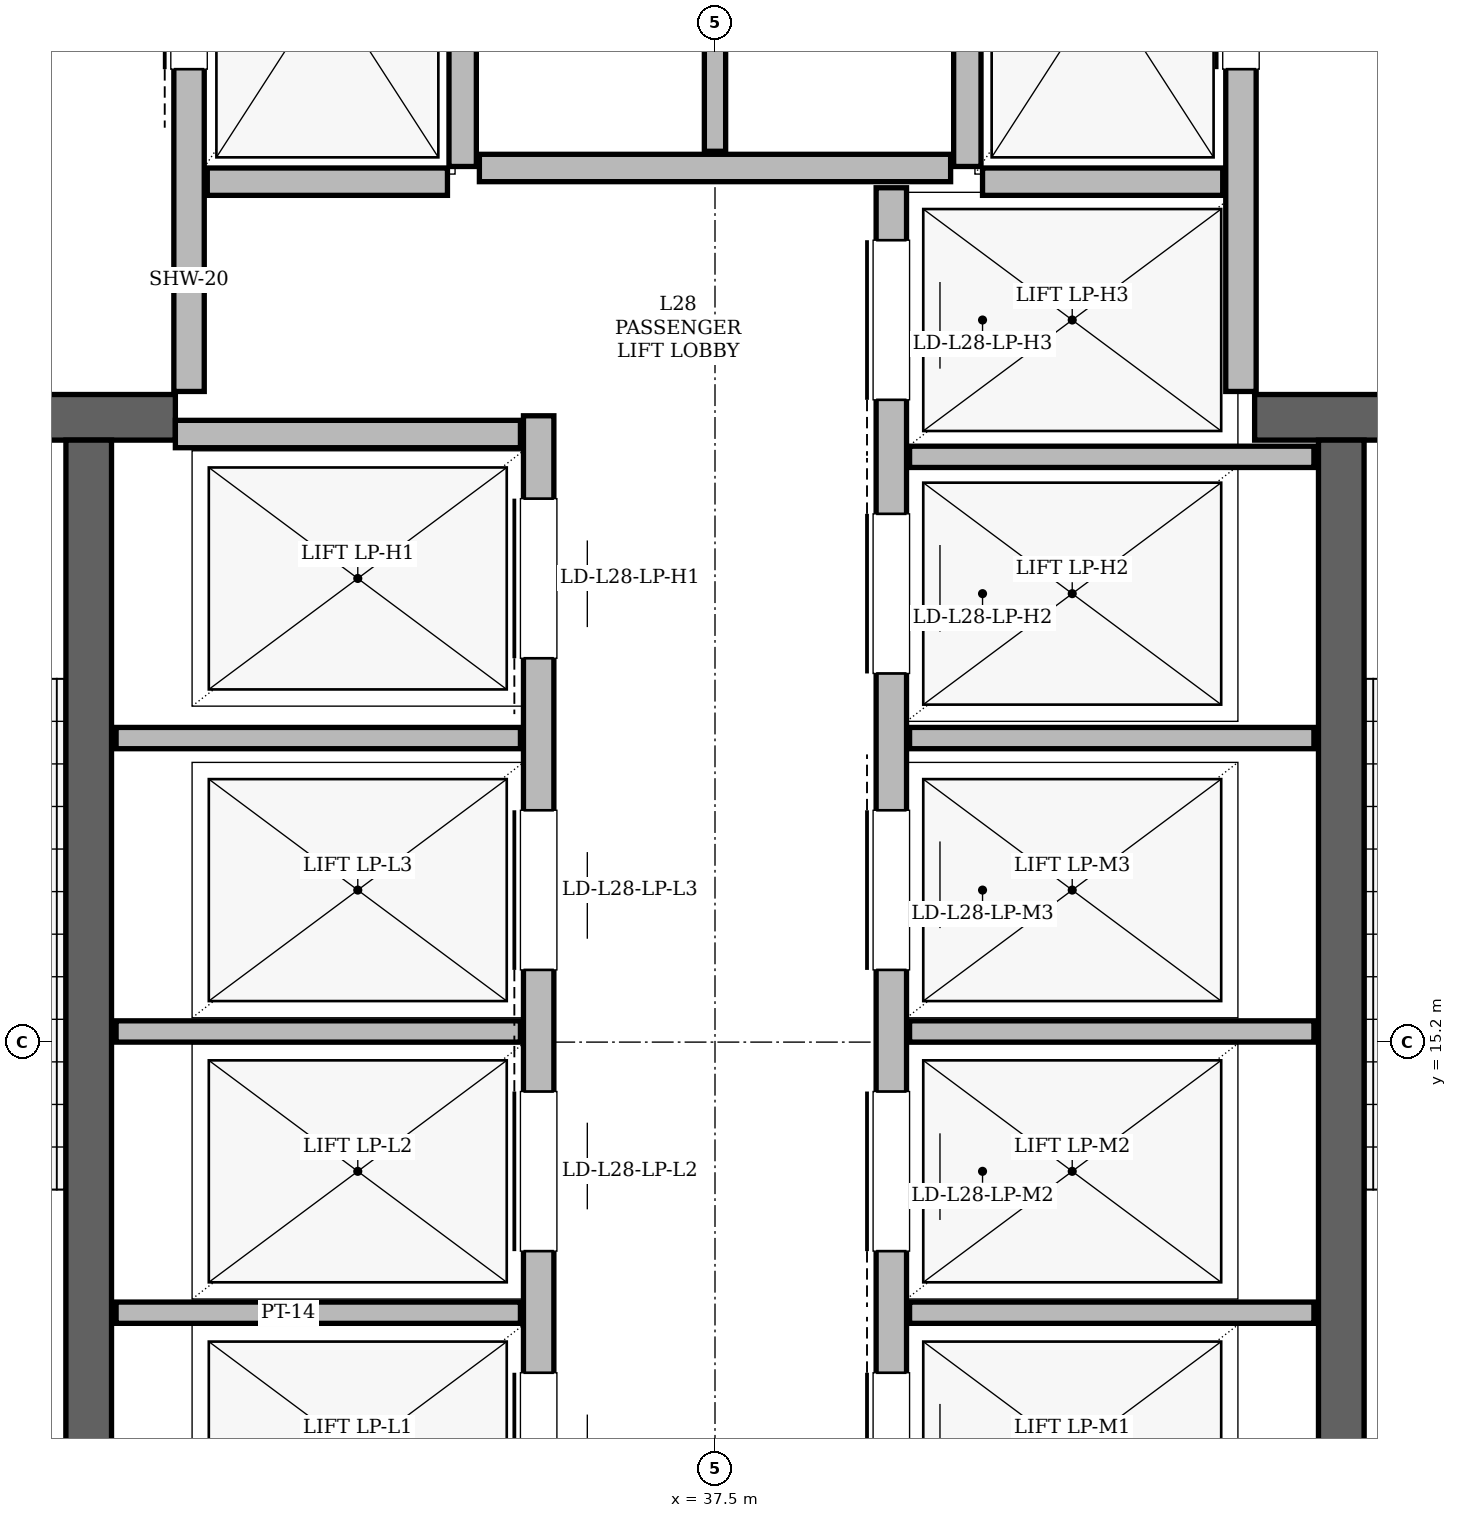
"""IFC4 building model, lengths in metres.
Left out: names, types, materials, properties, quantities, classifications, styles, units other than length and angle.
Written with IfcOpenShell. Run it as: python <this file> out.ifc"""

import sys

from ifc_helpers import new_model, si_unit, direction, frame, frame_2d, origin, place, context, subcontext, project, spatial, rectangle, extrude, element, fill, save


model = new_model("IFC4")
c1 = context("Model", 3, precision=1e-05, world=origin(), true_north=direction((0.0, 1.0)))
c2 = subcontext(c1, "Body", "Model", "MODEL_VIEW")
j1 = project(units=[si_unit("LENGTHUNIT", "METRE"), si_unit("PLANEANGLEUNIT", "RADIAN")], contexts=[c1])
p1 = place(None, origin())
s1 = spatial("IfcSite", under=j1, at=p1, CompositionType="ELEMENT")
p2 = place(p1, origin())
s2 = spatial("IfcBuilding", under=s1, at=p2, CompositionType="ELEMENT")
p3 = place(p2, frame((0.0, 0.0, 107.7)))
s3 = spatial("IfcBuildingStorey", under=s2, at=p3, CompositionType="ELEMENT", Elevation=107.7)
p4 = place(p3, frame((29.94, 19.31, 0.0), z_axis=(0.0, 0.0, 1.0), x_axis=(1.0, 0.0, 0.0)))
e1 = element("IfcWall", 1, at=p4, inside=s3, PredefinedType="SHEAR", context=c2, shape_type="SweptSolid", body=[
    extrude(rectangle(XDim=4.01, YDim=0.3, at=frame_2d((2.005, 0.0))), origin(), (0.0, 0.0, 1.0), 4.26),
])
p5 = place(p4, frame((1.01, 0.0, 0.0)))
e2 = element("IfcOpeningElement", 2, at=p5, cuts=e1, PredefinedType="OPENING", context=c2, shape_type="SweptSolid", body=[
    extrude(rectangle(XDim=1.4, YDim=2.2, at=frame_2d((0.7, 1.1))), frame((0.0, 0.15, 0.0), z_axis=(0.0, -1.0, 0.0), x_axis=(1.0, 0.0, 0.0)), (0.0, 0.0, 1.0), 0.3),
])
p6 = place(p3, frame((41.05, 19.31, 0.0), z_axis=(0.0, 0.0, 1.0), x_axis=(1.0, 0.0, 0.0)))
e3 = element("IfcWall", 3, at=p6, inside=s3, PredefinedType="SHEAR", context=c2, shape_type="SweptSolid", body=[
    extrude(rectangle(XDim=4.01, YDim=0.3, at=frame_2d((2.005, 0.0))), origin(), (0.0, 0.0, 1.0), 4.26),
])
p7 = place(p6, frame((1.6, 0.0, 0.0)))
e4 = element("IfcOpeningElement", 4, at=p7, cuts=e3, PredefinedType="OPENING", context=c2, shape_type="SweptSolid", body=[
    extrude(rectangle(XDim=1.4, YDim=2.2, at=frame_2d((0.7, 1.1))), frame((0.0, 0.15, 0.0), z_axis=(0.0, -1.0, 0.0), x_axis=(1.0, 0.0, 0.0)), (0.0, 0.0, 1.0), 0.3),
])
for number, where, z_axis, x_axis in (
    (5, (33.38, 11.54, 0.0), (0.0, 0.0, 1.0), (0.0, 1.0, 0.0)),
    (6, (41.62, 11.54, 0.0), (0.0, 0.0, 1.0), (0.0, 1.0, 0.0)),
):
    element("IfcWall", number, at=place(p3, frame(where, z_axis=z_axis, x_axis=x_axis)), inside=s3, PredefinedType="SHEAR", context=c2, shape_type="SweptSolid", body=[
        extrude(rectangle(XDim=7.62, YDim=0.3, at=frame_2d((3.81, 0.0))), origin(), (0.0, 0.0, 1.0), 4.26),
    ])
p8 = place(p3, frame((34.04, 19.48, 0.0), z_axis=(0.0, 0.0, 1.0), x_axis=(0.0, 1.0, 0.0)))
e7 = element("IfcWall", 7, at=p8, inside=s3, PredefinedType="PARTITIONING", context=c2, shape_type="SweptSolid", body=[
    extrude(rectangle(XDim=4.5, YDim=0.2, at=frame_2d((2.25, 0.0))), origin(), (0.0, 0.0, 1.0), 3.3),
])
p9 = place(p8, frame((2.12, 0.0, 0.0)))
e8 = element("IfcOpeningElement", 8, at=p9, cuts=e7, PredefinedType="OPENING", context=c2, shape_type="SweptSolid", body=[
    extrude(rectangle(XDim=1.1, YDim=2.2, at=frame_2d((0.55, 1.1))), frame((0.0, 0.1, 0.0), z_axis=(0.0, -1.0, 0.0), x_axis=(1.0, 0.0, 0.0)), (0.0, 0.0, 1.0), 0.2),
])
p10 = place(p3, frame((35.84, 20.96, 0.0), z_axis=(0.0, 0.0, 1.0), x_axis=(0.0, 1.0, 0.0)))
e9 = element("IfcWall", 9, at=p10, inside=s3, PredefinedType="PARTITIONING", context=c2, shape_type="SweptSolid", body=[
    extrude(rectangle(XDim=3.02, YDim=0.18, at=frame_2d((1.51, 0.0))), origin(), (0.0, 0.0, 1.0), 3.3),
])
p11 = place(p3, frame((34.16, 20.86, 0.0), z_axis=(0.0, 0.0, 1.0), x_axis=(1.0, 0.0, 0.0)))
e10 = element("IfcWall", 10, at=p11, inside=s3, PredefinedType="PARTITIONING", context=c2, shape_type="SweptSolid", body=[
    extrude(rectangle(XDim=1.58, YDim=0.18, at=frame_2d((0.79, 0.0))), origin(), (0.0, 0.0, 1.0), 4.26),
])
p12 = place(p3, frame((40.96, 19.48, 0.0), z_axis=(0.0, 0.0, 1.0), x_axis=(0.0, 1.0, 0.0)))
e11 = element("IfcWall", 11, at=p12, inside=s3, PredefinedType="PARTITIONING", context=c2, shape_type="SweptSolid", body=[
    extrude(rectangle(XDim=4.5, YDim=0.2, at=frame_2d((2.25, 0.0))), origin(), (0.0, 0.0, 1.0), 3.3),
])
p13 = place(p12, frame((2.12, 0.0, 0.0)))
e12 = element("IfcOpeningElement", 12, at=p13, cuts=e11, PredefinedType="OPENING", context=c2, shape_type="SweptSolid", body=[
    extrude(rectangle(XDim=1.1, YDim=2.2, at=frame_2d((0.55, 1.1))), frame((0.0, 0.1, 0.0), z_axis=(0.0, -1.0, 0.0), x_axis=(1.0, 0.0, 0.0)), (0.0, 0.0, 1.0), 0.2),
])
p14 = place(p3, frame((39.16, 20.96, 0.0), z_axis=(0.0, 0.0, 1.0), x_axis=(0.0, 1.0, 0.0)))
e13 = element("IfcWall", 13, at=p14, inside=s3, PredefinedType="PARTITIONING", context=c2, shape_type="SweptSolid", body=[
    extrude(rectangle(XDim=3.02, YDim=0.18, at=frame_2d((1.51, 0.0))), origin(), (0.0, 0.0, 1.0), 3.3),
])
p15 = place(p3, frame((39.26, 20.86, 0.0), z_axis=(0.0, 0.0, 1.0), x_axis=(1.0, 0.0, 0.0)))
e14 = element("IfcWall", 14, at=p15, inside=s3, PredefinedType="PARTITIONING", context=c2, shape_type="SweptSolid", body=[
    extrude(rectangle(XDim=1.58, YDim=0.18, at=frame_2d((0.79, 0.0))), origin(), (0.0, 0.0, 1.0), 4.26),
])
p16 = place(p3, frame((36.34, 11.72, 0.0), z_axis=(0.0, 0.0, 1.0), x_axis=(0.0, 1.0, 0.0)))
e15 = element("IfcWall", 15, at=p16, inside=s3, PredefinedType="PARTITIONING", context=c2, shape_type="SweptSolid", body=[
    extrude(rectangle(XDim=7.6, YDim=0.2, at=frame_2d((3.8, 0.0))), origin(), (0.0, 0.0, 1.0), 4.26),
])
p17 = place(p16, frame((0.255, 0.0, 0.0)))
e16 = element("IfcOpeningElement", 16, at=p17, cuts=e15, PredefinedType="OPENING", context=c2, shape_type="SweptSolid", body=[
    extrude(rectangle(XDim=1.05, YDim=2.15, at=frame_2d((0.525, 1.075))), frame((0.0, 0.1, 0.0), z_axis=(0.0, -1.0, 0.0), x_axis=(1.0, 0.0, 0.0)), (0.0, 0.0, 1.0), 0.2),
])
p18 = place(p16, frame((2.105, 0.0, 0.0)))
e17 = element("IfcOpeningElement", 17, at=p18, cuts=e15, PredefinedType="OPENING", context=c2, shape_type="SweptSolid", body=[
    extrude(rectangle(XDim=1.05, YDim=2.15, at=frame_2d((0.525, 1.075))), frame((0.0, 0.1, 0.0), z_axis=(0.0, -1.0, 0.0), x_axis=(1.0, 0.0, 0.0)), (0.0, 0.0, 1.0), 0.2),
])
p19 = place(p16, frame((3.955, 0.0, 0.0)))
e18 = element("IfcOpeningElement", 18, at=p19, cuts=e15, PredefinedType="OPENING", context=c2, shape_type="SweptSolid", body=[
    extrude(rectangle(XDim=1.05, YDim=2.15, at=frame_2d((0.525, 1.075))), frame((0.0, 0.1, 0.0), z_axis=(0.0, -1.0, 0.0), x_axis=(1.0, 0.0, 0.0)), (0.0, 0.0, 1.0), 0.2),
])
p20 = place(p16, frame((6.005, 0.0, 0.0)))
e19 = element("IfcOpeningElement", 19, at=p20, cuts=e15, PredefinedType="OPENING", context=c2, shape_type="SweptSolid", body=[
    extrude(rectangle(XDim=1.05, YDim=2.15, at=frame_2d((0.525, 1.075))), frame((0.0, 0.1, 0.0), z_axis=(0.0, -1.0, 0.0), x_axis=(1.0, 0.0, 0.0)), (0.0, 0.0, 1.0), 0.2),
])
p21 = place(p3, frame((33.95, 19.2, 0.0), z_axis=(0.0, 0.0, 1.0), x_axis=(1.0, 0.0, 0.0)))
e20 = element("IfcWall", 20, at=p21, inside=s3, PredefinedType="PARTITIONING", context=c2, shape_type="SweptSolid", body=[
    extrude(rectangle(XDim=2.27, YDim=0.18, at=frame_2d((1.135, 0.0))), origin(), (0.0, 0.0, 1.0), 4.26),
])
for number, where, z_axis, x_axis in (
    (21, (33.56, 13.42, 0.0), (0.0, 0.0, 1.0), (1.0, 0.0, 0.0)),
    (22, (33.56, 15.27, 0.0), (0.0, 0.0, 1.0), (1.0, 0.0, 0.0)),
    (23, (33.56, 17.2, 0.0), (0.0, 0.0, 1.0), (1.0, 0.0, 0.0)),
):
    element("IfcWall", number, at=place(p3, frame(where, z_axis=z_axis, x_axis=x_axis)), inside=s3, PredefinedType="PARTITIONING", context=c2, shape_type="SweptSolid", body=[
        extrude(rectangle(XDim=2.66, YDim=0.14, at=frame_2d((1.33, 0.0))), origin(), (0.0, 0.0, 1.0), 4.26),
    ])
p22 = place(p3, frame((38.66, 11.72, 0.0), z_axis=(0.0, 0.0, 1.0), x_axis=(0.0, 1.0, 0.0)))
e24 = element("IfcWall", 24, at=p22, inside=s3, PredefinedType="PARTITIONING", context=c2, shape_type="SweptSolid", body=[
    extrude(rectangle(XDim=9.1, YDim=0.2, at=frame_2d((4.55, 0.0))), origin(), (0.0, 0.0, 1.0), 4.26),
])
p23 = place(p22, frame((0.255, 0.0, 0.0)))
e25 = element("IfcOpeningElement", 25, at=p23, cuts=e24, PredefinedType="OPENING", context=c2, shape_type="SweptSolid", body=[
    extrude(rectangle(XDim=1.05, YDim=2.15, at=frame_2d((0.525, 1.075))), frame((0.0, 0.1, 0.0), z_axis=(0.0, -1.0, 0.0), x_axis=(1.0, 0.0, 0.0)), (0.0, 0.0, 1.0), 0.2),
])
p24 = place(p22, frame((2.105, 0.0, 0.0)))
e26 = element("IfcOpeningElement", 26, at=p24, cuts=e24, PredefinedType="OPENING", context=c2, shape_type="SweptSolid", body=[
    extrude(rectangle(XDim=1.05, YDim=2.15, at=frame_2d((0.525, 1.075))), frame((0.0, 0.1, 0.0), z_axis=(0.0, -1.0, 0.0), x_axis=(1.0, 0.0, 0.0)), (0.0, 0.0, 1.0), 0.2),
])
p25 = place(p22, frame((3.955, 0.0, 0.0)))
e27 = element("IfcOpeningElement", 27, at=p25, cuts=e24, PredefinedType="OPENING", context=c2, shape_type="SweptSolid", body=[
    extrude(rectangle(XDim=1.05, YDim=2.15, at=frame_2d((0.525, 1.075))), frame((0.0, 0.1, 0.0), z_axis=(0.0, -1.0, 0.0), x_axis=(1.0, 0.0, 0.0)), (0.0, 0.0, 1.0), 0.2),
])
p26 = place(p22, frame((5.905, 0.0, 0.0)))
e28 = element("IfcOpeningElement", 28, at=p26, cuts=e24, PredefinedType="OPENING", context=c2, shape_type="SweptSolid", body=[
    extrude(rectangle(XDim=1.05, YDim=2.15, at=frame_2d((0.525, 1.075))), frame((0.0, 0.1, 0.0), z_axis=(0.0, -1.0, 0.0), x_axis=(1.0, 0.0, 0.0)), (0.0, 0.0, 1.0), 0.2),
])
p27 = place(p22, frame((7.705, 0.0, 0.0)))
e29 = element("IfcOpeningElement", 29, at=p27, cuts=e24, PredefinedType="OPENING", context=c2, shape_type="SweptSolid", body=[
    extrude(rectangle(XDim=1.05, YDim=2.15, at=frame_2d((0.525, 1.075))), frame((0.0, 0.1, 0.0), z_axis=(0.0, -1.0, 0.0), x_axis=(1.0, 0.0, 0.0)), (0.0, 0.0, 1.0), 0.2),
])
for number, where, z_axis, x_axis in (
    (30, (38.78, 13.42, 0.0), (0.0, 0.0, 1.0), (1.0, 0.0, 0.0)),
    (31, (38.78, 15.27, 0.0), (0.0, 0.0, 1.0), (1.0, 0.0, 0.0)),
    (32, (38.78, 17.2, 0.0), (0.0, 0.0, 1.0), (1.0, 0.0, 0.0)),
    (33, (38.78, 19.05, 0.0), (0.0, 0.0, 1.0), (1.0, 0.0, 0.0)),
):
    element("IfcWall", number, at=place(p3, frame(where, z_axis=z_axis, x_axis=x_axis)), inside=s3, PredefinedType="PARTITIONING", context=c2, shape_type="SweptSolid", body=[
        extrude(rectangle(XDim=2.66, YDim=0.14, at=frame_2d((1.33, 0.0))), origin(), (0.0, 0.0, 1.0), 4.26),
    ])
p28 = place(p3, frame((35.95, 20.95, 0.0), z_axis=(0.0, 0.0, 1.0), x_axis=(1.0, 0.0, 0.0)))
e34 = element("IfcWall", 34, at=p28, inside=s3, PredefinedType="PARTITIONING", context=c2, shape_type="SweptSolid", body=[
    extrude(rectangle(XDim=3.1, YDim=0.18, at=frame_2d((1.55, 0.0))), origin(), (0.0, 0.0, 1.0), 4.26),
])
p29 = place(p3, frame((37.5, 21.06, 0.0), z_axis=(0.0, 0.0, 1.0), x_axis=(0.0, 1.0, 0.0)))
e35 = element("IfcWall", 35, at=p29, inside=s3, PredefinedType="PARTITIONING", context=c2, shape_type="SweptSolid", body=[
    extrude(rectangle(XDim=2.92, YDim=0.14, at=frame_2d((1.46, 0.0))), origin(), (0.0, 0.0, 1.0), 3.3),
])
p30 = place(p9, origin())
e36 = element("IfcDoor", 36, at=p30, inside=s3, OperationType="SLIDING_TO_LEFT", PredefinedType="DOOR", context=c2, shape_type="SweptSolid", body=[
    extrude(rectangle(XDim=1.1, YDim=2.2, at=frame_2d((0.55, 1.1))), frame((0.0, 0.025, 0.0), z_axis=(0.0, -1.0, 0.0), x_axis=(1.0, 0.0, 0.0)), (0.0, 0.0, 1.0), 0.05),
])
fill(e8, e36)
p31 = place(p13, origin())
e37 = element("IfcDoor", 37, at=p31, inside=s3, OperationType="SLIDING_TO_RIGHT", PredefinedType="DOOR", context=c2, shape_type="SweptSolid", body=[
    extrude(rectangle(XDim=1.1, YDim=2.2, at=frame_2d((0.55, 1.1))), frame((0.0, 0.025, 0.0), z_axis=(0.0, -1.0, 0.0), x_axis=(1.0, 0.0, 0.0)), (0.0, 0.0, 1.0), 0.05),
])
fill(e12, e37)
p32 = place(p17, origin())
e38 = element("IfcDoor", 38, at=p32, inside=s3, OperationType="SLIDING_TO_LEFT", PredefinedType="DOOR", context=c2, shape_type="SweptSolid", body=[
    extrude(rectangle(XDim=1.05, YDim=2.15, at=frame_2d((0.525, 1.075))), frame((0.0, 0.025, 0.0), z_axis=(0.0, -1.0, 0.0), x_axis=(1.0, 0.0, 0.0)), (0.0, 0.0, 1.0), 0.05),
])
fill(e16, e38)
p33 = place(p18, origin())
e39 = element("IfcDoor", 39, at=p33, inside=s3, OperationType="SLIDING_TO_RIGHT", PredefinedType="DOOR", context=c2, shape_type="SweptSolid", body=[
    extrude(rectangle(XDim=1.05, YDim=2.15, at=frame_2d((0.525, 1.075))), frame((0.0, 0.025, 0.0), z_axis=(0.0, -1.0, 0.0), x_axis=(1.0, 0.0, 0.0)), (0.0, 0.0, 1.0), 0.05),
])
fill(e17, e39)
p34 = place(p19, origin())
e40 = element("IfcDoor", 40, at=p34, inside=s3, OperationType="SLIDING_TO_LEFT", PredefinedType="DOOR", context=c2, shape_type="SweptSolid", body=[
    extrude(rectangle(XDim=1.05, YDim=2.15, at=frame_2d((0.525, 1.075))), frame((0.0, 0.025, 0.0), z_axis=(0.0, -1.0, 0.0), x_axis=(1.0, 0.0, 0.0)), (0.0, 0.0, 1.0), 0.05),
])
fill(e18, e40)
p35 = place(p23, origin())
e41 = element("IfcDoor", 41, at=p35, inside=s3, OperationType="SLIDING_TO_RIGHT", PredefinedType="DOOR", context=c2, shape_type="SweptSolid", body=[
    extrude(rectangle(XDim=1.05, YDim=2.15, at=frame_2d((0.525, 1.075))), frame((0.0, 0.025, 0.0), z_axis=(0.0, -1.0, 0.0), x_axis=(1.0, 0.0, 0.0)), (0.0, 0.0, 1.0), 0.05),
])
fill(e25, e41)
p36 = place(p24, origin())
e42 = element("IfcDoor", 42, at=p36, inside=s3, OperationType="SLIDING_TO_LEFT", PredefinedType="DOOR", context=c2, shape_type="SweptSolid", body=[
    extrude(rectangle(XDim=1.05, YDim=2.15, at=frame_2d((0.525, 1.075))), frame((0.0, 0.025, 0.0), z_axis=(0.0, -1.0, 0.0), x_axis=(1.0, 0.0, 0.0)), (0.0, 0.0, 1.0), 0.05),
])
fill(e26, e42)
p37 = place(p25, origin())
e43 = element("IfcDoor", 43, at=p37, inside=s3, OperationType="SLIDING_TO_RIGHT", PredefinedType="DOOR", context=c2, shape_type="SweptSolid", body=[
    extrude(rectangle(XDim=1.05, YDim=2.15, at=frame_2d((0.525, 1.075))), frame((0.0, 0.025, 0.0), z_axis=(0.0, -1.0, 0.0), x_axis=(1.0, 0.0, 0.0)), (0.0, 0.0, 1.0), 0.05),
])
fill(e27, e43)
p38 = place(p20, origin())
e44 = element("IfcDoor", 44, at=p38, inside=s3, OperationType="SLIDING_TO_LEFT", PredefinedType="DOOR", context=c2, shape_type="SweptSolid", body=[
    extrude(rectangle(XDim=1.05, YDim=2.15, at=frame_2d((0.525, 1.075))), frame((0.0, 0.025, 0.0), z_axis=(0.0, -1.0, 0.0), x_axis=(1.0, 0.0, 0.0)), (0.0, 0.0, 1.0), 0.05),
])
fill(e19, e44)
p39 = place(p26, origin())
e45 = element("IfcDoor", 45, at=p39, inside=s3, OperationType="SLIDING_TO_RIGHT", PredefinedType="DOOR", context=c2, shape_type="SweptSolid", body=[
    extrude(rectangle(XDim=1.05, YDim=2.15, at=frame_2d((0.525, 1.075))), frame((0.0, 0.025, 0.0), z_axis=(0.0, -1.0, 0.0), x_axis=(1.0, 0.0, 0.0)), (0.0, 0.0, 1.0), 0.05),
])
fill(e28, e45)
p40 = place(p27, origin())
e46 = element("IfcDoor", 46, at=p40, inside=s3, OperationType="SLIDING_TO_LEFT", PredefinedType="DOOR", context=c2, shape_type="SweptSolid", body=[
    extrude(rectangle(XDim=1.05, YDim=2.15, at=frame_2d((0.525, 1.075))), frame((0.0, 0.025, 0.0), z_axis=(0.0, -1.0, 0.0), x_axis=(1.0, 0.0, 0.0)), (0.0, 0.0, 1.0), 0.05),
])
fill(e29, e46)
save(model, sys.argv[1])
